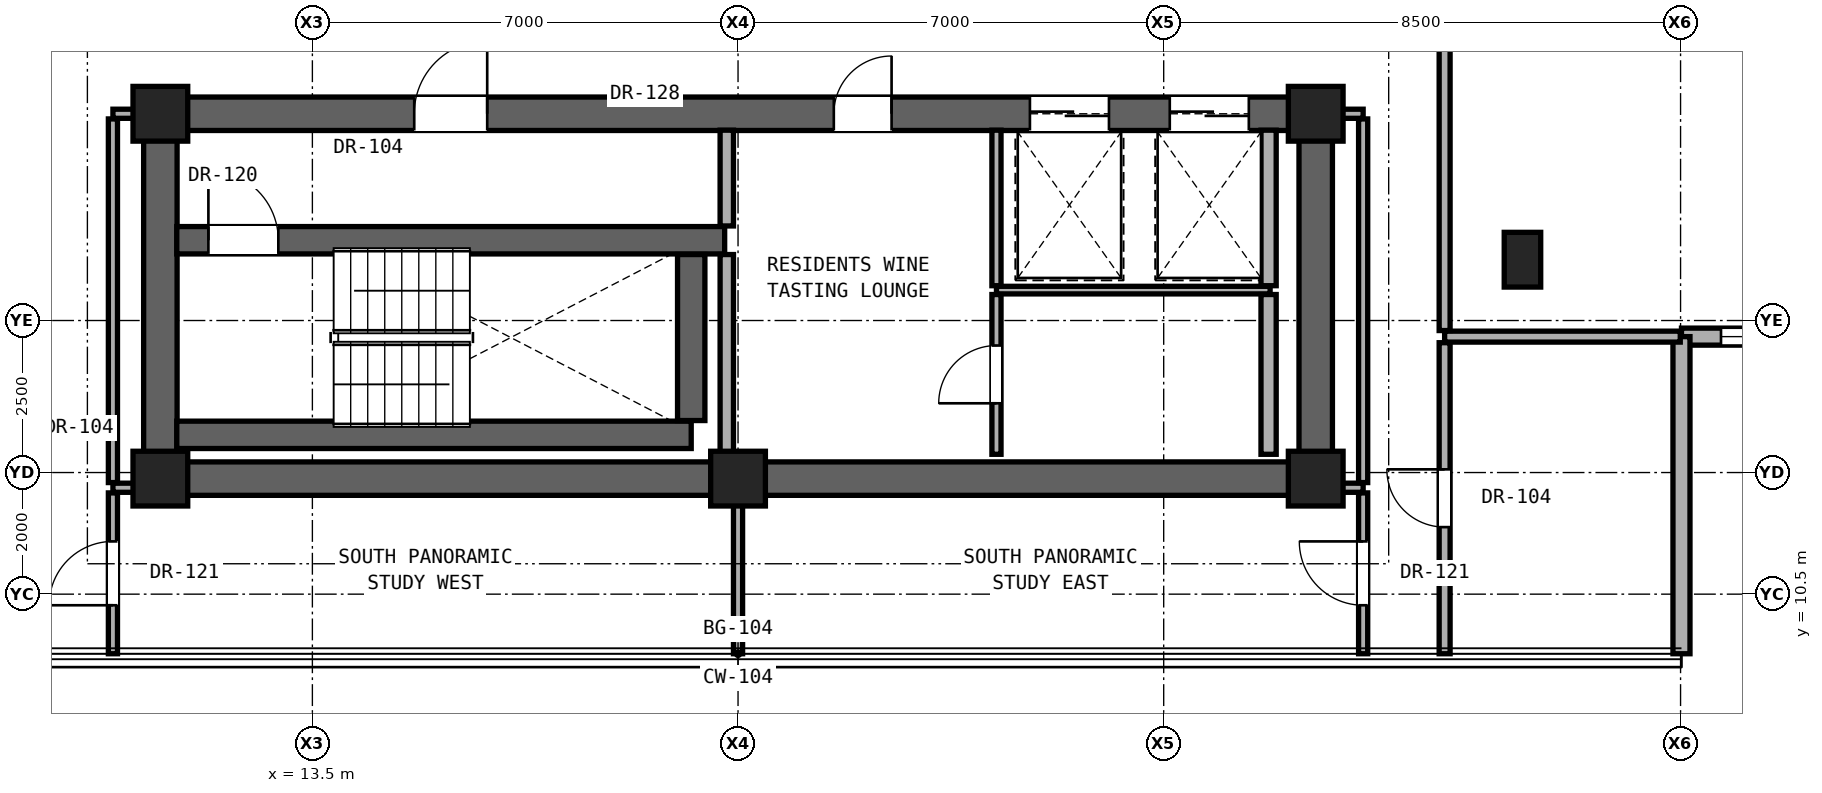
"""IFC4 building model, lengths in metres.
Left out: names, types, materials, properties, quantities, classifications, styles, units other than length and angle.
Written with IfcOpenShell. Run it as: python <this file> out.ifc"""

import sys

from ifc_helpers import new_model, si_unit, direction, frame, frame_2d, origin, origin_2d, place, context, subcontext, project, spatial, rectangle, extrude, element, fill, save


model = new_model("IFC4")
c1 = context("Model", 3, precision=1e-05, world=origin(), true_north=direction((0.0, 1.0)))
c2 = subcontext(c1, "Body", "Model", "MODEL_VIEW")
j1 = project(units=[si_unit("LENGTHUNIT", "METRE"), si_unit("PLANEANGLEUNIT", "RADIAN")], contexts=[c1])
p1 = place(None, origin())
s1 = spatial("IfcSite", under=j1, at=p1, CompositionType="ELEMENT")
p2 = place(p1, origin())
s2 = spatial("IfcBuilding", under=s1, at=p2, CompositionType="ELEMENT")
p3 = place(p2, frame((0.0, 0.0, 199.9)))
s3 = spatial("IfcBuildingStorey", under=s2, at=p3, CompositionType="ELEMENT", Elevation=199.9)
for number, where, z_axis, x_axis in (
    (1, (11.0, 12.4, 0.0), (0.0, 0.0, 1.0), (1.0, 0.0, 0.0)),
    (2, (20.5, 12.4, 0.0), (0.0, 0.0, 1.0), (1.0, 0.0, 0.0)),
    (3, (30.0, 12.4, 0.0), (0.0, 0.0, 1.0), (1.0, 0.0, 0.0)),
    (4, (11.0, 18.4, 0.0), (0.0, 0.0, 1.0), (1.0, 0.0, 0.0)),
    (5, (30.0, 18.4, 0.0), (0.0, 0.0, 1.0), (1.0, 0.0, 0.0)),
):
    element("IfcColumn", number, at=place(p3, frame(where, z_axis=z_axis, x_axis=x_axis)), inside=s3, PredefinedType="COLUMN", context=c2, shape_type="SweptSolid", body=[
        extrude(rectangle(XDim=0.9, YDim=0.9, at=origin_2d()), origin(), (0.0, 0.0, 1.0), 3.25),
    ])
p4 = place(p3, frame((33.4, 16.0, 0.0), z_axis=(0.0, 0.0, 1.0), x_axis=(1.0, 0.0, 0.0)))
e6 = element("IfcColumn", 6, at=p4, inside=s3, PredefinedType="PILASTER", context=c2, shape_type="SweptSolid", body=[
    extrude(rectangle(XDim=0.6, YDim=0.9, at=origin_2d()), origin(), (0.0, 0.0, 1.0), 3.25),
])
p5 = place(p3, frame((11.0, 12.4, 0.0), z_axis=(0.0, 0.0, 1.0), x_axis=(1.0, 0.0, 0.0)))
e7 = element("IfcWall", 7, at=p5, inside=s3, PredefinedType="SHEAR", context=c2, shape_type="SweptSolid", body=[
    extrude(rectangle(XDim=19.0, YDim=0.55, at=frame_2d((9.5, 0.0))), origin(), (0.0, 0.0, 1.0), 3.05),
])
for number, where, z_axis, x_axis in (
    (8, (11.0, 12.4, 0.0), (0.0, 0.0, 1.0), (0.0, 1.0, 0.0)),
    (9, (30.0, 12.4, 0.0), (0.0, 0.0, 1.0), (0.0, 1.0, 0.0)),
):
    element("IfcWall", number, at=place(p3, frame(where, z_axis=z_axis, x_axis=x_axis)), inside=s3, PredefinedType="SHEAR", context=c2, shape_type="SweptSolid", body=[
        extrude(rectangle(XDim=6.0, YDim=0.55, at=frame_2d((3.0, 0.0))), origin(), (0.0, 0.0, 1.0), 3.05),
    ])
p6 = place(p3, frame((11.0, 18.4, 0.0), z_axis=(0.0, 0.0, 1.0), x_axis=(1.0, 0.0, 0.0)))
e10 = element("IfcWall", 10, at=p6, inside=s3, PredefinedType="SHEAR", context=c2, shape_type="SweptSolid", body=[
    extrude(rectangle(XDim=19.0, YDim=0.55, at=frame_2d((9.5, 0.0))), origin(), (0.0, 0.0, 1.0), 3.05),
])
p7 = place(p6, frame((4.175, 0.0, 0.0)))
e11 = element("IfcOpeningElement", 11, at=p7, cuts=e10, PredefinedType="OPENING", context=c2, shape_type="SweptSolid", body=[
    extrude(rectangle(XDim=1.2, YDim=2.25, at=frame_2d((0.6, 1.125))), frame((0.0, 0.285, 0.0), z_axis=(0.0, -1.0, 0.0), x_axis=(1.0, 0.0, 0.0)), (0.0, 0.0, 1.0), 0.57),
])
p8 = place(p6, frame((11.075, 0.0, 0.0)))
e12 = element("IfcOpeningElement", 12, at=p8, cuts=e10, PredefinedType="OPENING", context=c2, shape_type="SweptSolid", body=[
    extrude(rectangle(XDim=0.95, YDim=2.15, at=frame_2d((0.475, 1.075))), frame((0.0, 0.285, 0.0), z_axis=(0.0, -1.0, 0.0), x_axis=(1.0, 0.0, 0.0)), (0.0, 0.0, 1.0), 0.57),
])
p9 = place(p6, frame((14.3, 0.0, 0.0)))
e13 = element("IfcOpeningElement", 13, at=p9, cuts=e10, PredefinedType="OPENING", context=c2, shape_type="SweptSolid", body=[
    extrude(rectangle(XDim=1.3, YDim=2.3, at=frame_2d((0.65, 1.15))), frame((0.0, 0.285, 0.0), z_axis=(0.0, -1.0, 0.0), x_axis=(1.0, 0.0, 0.0)), (0.0, 0.0, 1.0), 0.57),
])
p10 = place(p6, frame((16.6, 0.0, 0.0)))
e14 = element("IfcOpeningElement", 14, at=p10, cuts=e10, PredefinedType="OPENING", context=c2, shape_type="SweptSolid", body=[
    extrude(rectangle(XDim=1.3, YDim=2.3, at=frame_2d((0.65, 1.15))), frame((0.0, 0.285, 0.0), z_axis=(0.0, -1.0, 0.0), x_axis=(1.0, 0.0, 0.0)), (0.0, 0.0, 1.0), 0.57),
])
p11 = place(p3, frame((36.015, 14.735, 0.0), z_axis=(0.0, 0.0, 1.0), x_axis=(1.0, 0.0, 0.0)))
e15 = element("IfcWall", 15, at=p11, inside=s3, PredefinedType="SOLIDWALL", context=c2, shape_type="SweptSolid", body=[
    extrude(rectangle(XDim=5.215, YDim=0.28, at=frame_2d((2.607, 0.0))), origin(), (0.0, 0.0, 1.0), 3.03),
])
p12 = place(p11, frame((0.65, 0.0, 0.85)))
e16 = element("IfcOpeningElement", 16, at=p12, cuts=e15, PredefinedType="OPENING", context=c2, shape_type="SweptSolid", body=[
    extrude(rectangle(XDim=1.1, YDim=2.0, at=frame_2d((0.55, 1.0))), frame((0.0, 0.15, 0.0), z_axis=(0.0, -1.0, 0.0), x_axis=(1.0, 0.0, 0.0)), (0.0, 0.0, 1.0), 0.3),
])
p13 = place(p3, frame((36.015, 9.52, 0.0), z_axis=(0.0, 0.0, 1.0), x_axis=(0.0, 1.0, 0.0)))
e17 = element("IfcWall", 17, at=p13, inside=s3, PredefinedType="SOLIDWALL", context=c2, shape_type="SweptSolid", body=[
    extrude(rectangle(XDim=5.215, YDim=0.28, at=frame_2d((2.607, 0.0))), origin(), (0.0, 0.0, 1.0), 3.03),
])
for number, where, z_axis, x_axis in (
    (18, (10.22, 12.25, 0.0), (0.0, 0.0, 1.0), (1.0, 0.0, 0.0)),
    (19, (30.27, 12.25, 0.0), (0.0, 0.0, 1.0), (1.0, 0.0, 0.0)),
):
    element("IfcWall", number, at=place(p3, frame(where, z_axis=z_axis, x_axis=x_axis)), inside=s3, PredefinedType="PARTITIONING", context=c2, shape_type="SweptSolid", body=[
        extrude(rectangle(XDim=0.51, YDim=0.15, at=frame_2d((0.255, 0.0))), origin(), (0.0, 0.0, 1.0), 3.05),
    ])
p14 = place(p3, frame((11.27, 13.12, 0.0), z_axis=(0.0, 0.0, 1.0), x_axis=(1.0, 0.0, 0.0)))
e20 = element("IfcWall", 20, at=p14, inside=s3, PredefinedType="SHEAR", context=c2, shape_type="SweptSolid", body=[
    extrude(rectangle(XDim=8.46, YDim=0.45, at=frame_2d((4.23, 0.0))), origin(), (0.0, 0.0, 1.0), 3.05),
])
p15 = place(p3, frame((32.12, 14.735, 0.0), z_axis=(0.0, 0.0, 1.0), x_axis=(1.0, 0.0, 0.0)))
e21 = element("IfcWall", 21, at=p15, inside=s3, PredefinedType="PARTITIONING", context=c2, shape_type="SweptSolid", body=[
    extrude(rectangle(XDim=3.875, YDim=0.18, at=frame_2d((1.938, 0.0))), origin(), (0.0, 0.0, 1.0), 3.05),
])
p16 = place(p3, frame((24.75, 15.5, 0.0), z_axis=(0.0, 0.0, 1.0), x_axis=(1.0, 0.0, 0.0)))
e22 = element("IfcWall", 22, at=p16, inside=s3, PredefinedType="PARTITIONING", context=c2, shape_type="SweptSolid", body=[
    extrude(rectangle(XDim=4.5, YDim=0.125, at=frame_2d((2.25, 0.0))), origin(), (0.0, 0.0, 1.0), 3.05),
])
p17 = place(p3, frame((11.27, 16.32, 0.0), z_axis=(0.0, 0.0, 1.0), x_axis=(1.0, 0.0, 0.0)))
e23 = element("IfcWall", 23, at=p17, inside=s3, PredefinedType="SHEAR", context=c2, shape_type="SweptSolid", body=[
    extrude(rectangle(XDim=9.01, YDim=0.45, at=frame_2d((4.505, 0.0))), origin(), (0.0, 0.0, 1.0), 3.05),
])
p18 = place(p17, frame((0.52, 0.0, 0.0)))
e24 = element("IfcOpeningElement", 24, at=p18, cuts=e23, PredefinedType="OPENING", context=c2, shape_type="SweptSolid", body=[
    extrude(rectangle(XDim=1.15, YDim=2.2, at=frame_2d((0.575, 1.1))), frame((0.0, 0.235, 0.0), z_axis=(0.0, -1.0, 0.0), x_axis=(1.0, 0.0, 0.0)), (0.0, 0.0, 1.0), 0.47),
])
for number, where, z_axis, x_axis in (
    (25, (10.22, 18.4, 0.0), (0.0, 0.0, 1.0), (1.0, 0.0, 0.0)),
    (26, (30.27, 18.4, 0.0), (0.0, 0.0, 1.0), (1.0, 0.0, 0.0)),
):
    element("IfcWall", number, at=place(p3, frame(where, z_axis=z_axis, x_axis=x_axis)), inside=s3, PredefinedType="PARTITIONING", context=c2, shape_type="SweptSolid", body=[
        extrude(rectangle(XDim=0.51, YDim=0.15, at=frame_2d((0.255, 0.0))), origin(), (0.0, 0.0, 1.0), 2.442),
    ])
p19 = place(p3, frame((10.22, 9.52, 0.0), z_axis=(0.0, 0.0, 1.0), x_axis=(0.0, 1.0, 0.0)))
e27 = element("IfcWall", 27, at=p19, inside=s3, PredefinedType="PARTITIONING", context=c2, shape_type="SweptSolid", body=[
    extrude(rectangle(XDim=2.645, YDim=0.15, at=frame_2d((1.323, 0.0))), origin(), (0.0, 0.0, 1.0), 3.05),
])
p20 = place(p19, frame((0.798, 0.0, 0.0)))
e28 = element("IfcOpeningElement", 28, at=p20, cuts=e27, PredefinedType="OPENING", context=c2, shape_type="SweptSolid", body=[
    extrude(rectangle(XDim=1.05, YDim=2.2, at=frame_2d((0.525, 1.1))), frame((0.0, 0.085, 0.0), z_axis=(0.0, -1.0, 0.0), x_axis=(1.0, 0.0, 0.0)), (0.0, 0.0, 1.0), 0.17),
])
p21 = place(p3, frame((10.22, 12.335, 0.0), z_axis=(0.0, 0.0, 1.0), x_axis=(0.0, 1.0, 0.0)))
e29 = element("IfcWall", 29, at=p21, inside=s3, PredefinedType="PARTITIONING", context=c2, shape_type="SweptSolid", body=[
    extrude(rectangle(XDim=5.98, YDim=0.15, at=frame_2d((2.99, 0.0))), origin(), (0.0, 0.0, 1.0), 2.442),
])
p22 = place(p3, frame((19.73, 13.355, 0.0), z_axis=(0.0, 0.0, 1.0), x_axis=(0.0, 1.0, 0.0)))
e30 = element("IfcWall", 30, at=p22, inside=s3, PredefinedType="SHEAR", context=c2, shape_type="SweptSolid", body=[
    extrude(rectangle(XDim=2.73, YDim=0.45, at=frame_2d((1.365, 0.0))), origin(), (0.0, 0.0, 1.0), 3.05),
])
p23 = place(p3, frame((20.315, 12.8, 0.0), z_axis=(0.0, 0.0, 1.0), x_axis=(0.0, 1.0, 0.0)))
e31 = element("IfcWall", 31, at=p23, inside=s3, PredefinedType="SOLIDWALL", context=c2, shape_type="SweptSolid", body=[
    extrude(rectangle(XDim=3.285, YDim=0.22, at=frame_2d((1.643, 0.0))), origin(), (0.0, 0.0, 1.0), 3.05),
])
p24 = place(p3, frame((20.315, 16.555, 0.0), z_axis=(0.0, 0.0, 1.0), x_axis=(0.0, 1.0, 0.0)))
e32 = element("IfcWall", 32, at=p24, inside=s3, PredefinedType="SOLIDWALL", context=c2, shape_type="SweptSolid", body=[
    extrude(rectangle(XDim=1.575, YDim=0.22, at=frame_2d((0.788, 0.0))), origin(), (0.0, 0.0, 1.0), 3.05),
])
p25 = place(p3, frame((20.5, 9.52, 0.0), z_axis=(0.0, 0.0, 1.0), x_axis=(0.0, 1.0, 0.0)))
e33 = element("IfcWall", 33, at=p25, inside=s3, PredefinedType="PARTITIONING", context=c2, shape_type="SweptSolid", body=[
    extrude(rectangle(XDim=2.61, YDim=0.15, at=frame_2d((1.305, 0.0))), origin(), (0.0, 0.0, 1.0), 3.05),
])
p26 = place(p3, frame((24.75, 12.8, 0.0), z_axis=(0.0, 0.0, 1.0), x_axis=(0.0, 1.0, 0.0)))
e34 = element("IfcWall", 34, at=p26, inside=s3, PredefinedType="PARTITIONING", context=c2, shape_type="SweptSolid", body=[
    extrude(rectangle(XDim=2.627, YDim=0.15, at=frame_2d((1.314, 0.0))), origin(), (0.0, 0.0, 1.0), 3.05),
])
p27 = place(p26, frame((0.839, 0.0, 0.0)))
e35 = element("IfcOpeningElement", 35, at=p27, cuts=e34, PredefinedType="OPENING", context=c2, shape_type="SweptSolid", body=[
    extrude(rectangle(XDim=0.95, YDim=2.15, at=frame_2d((0.475, 1.075))), frame((0.0, 0.085, 0.0), z_axis=(0.0, -1.0, 0.0), x_axis=(1.0, 0.0, 0.0)), (0.0, 0.0, 1.0), 0.17),
])
p28 = place(p3, frame((24.75, 15.573, 0.0), z_axis=(0.0, 0.0, 1.0), x_axis=(0.0, 1.0, 0.0)))
e36 = element("IfcWall", 36, at=p28, inside=s3, PredefinedType="PARTITIONING", context=c2, shape_type="SweptSolid", body=[
    extrude(rectangle(XDim=2.557, YDim=0.15, at=frame_2d((1.279, 0.0))), origin(), (0.0, 0.0, 1.0), 3.05),
])
p29 = place(p3, frame((29.225, 12.8, 0.0), z_axis=(0.0, 0.0, 1.0), x_axis=(0.0, 1.0, 0.0)))
e37 = element("IfcWall", 37, at=p29, inside=s3, PredefinedType="SOLIDWALL", context=c2, shape_type="SweptSolid", body=[
    extrude(rectangle(XDim=2.627, YDim=0.25, at=frame_2d((1.314, 0.0))), origin(), (0.0, 0.0, 1.0), 3.05),
])
p30 = place(p3, frame((29.225, 15.573, 0.0), z_axis=(0.0, 0.0, 1.0), x_axis=(0.0, 1.0, 0.0)))
e38 = element("IfcWall", 38, at=p30, inside=s3, PredefinedType="SOLIDWALL", context=c2, shape_type="SweptSolid", body=[
    extrude(rectangle(XDim=2.557, YDim=0.25, at=frame_2d((1.279, 0.0))), origin(), (0.0, 0.0, 1.0), 3.05),
])
p31 = place(p3, frame((30.78, 9.52, 0.0), z_axis=(0.0, 0.0, 1.0), x_axis=(0.0, 1.0, 0.0)))
e39 = element("IfcWall", 39, at=p31, inside=s3, PredefinedType="PARTITIONING", context=c2, shape_type="SweptSolid", body=[
    extrude(rectangle(XDim=2.645, YDim=0.15, at=frame_2d((1.323, 0.0))), origin(), (0.0, 0.0, 1.0), 3.05),
])
p32 = place(p31, frame((0.798, 0.0, 0.0)))
e40 = element("IfcOpeningElement", 40, at=p32, cuts=e39, PredefinedType="OPENING", context=c2, shape_type="SweptSolid", body=[
    extrude(rectangle(XDim=1.05, YDim=2.2, at=frame_2d((0.525, 1.1))), frame((0.0, 0.085, 0.0), z_axis=(0.0, -1.0, 0.0), x_axis=(1.0, 0.0, 0.0)), (0.0, 0.0, 1.0), 0.17),
])
p33 = place(p3, frame((30.78, 12.335, 0.0), z_axis=(0.0, 0.0, 1.0), x_axis=(0.0, 1.0, 0.0)))
e41 = element("IfcWall", 41, at=p33, inside=s3, PredefinedType="PARTITIONING", context=c2, shape_type="SweptSolid", body=[
    extrude(rectangle(XDim=5.98, YDim=0.15, at=frame_2d((2.99, 0.0))), origin(), (0.0, 0.0, 1.0), 2.442),
])
p34 = place(p3, frame((32.12, 9.52, 0.0), z_axis=(0.0, 0.0, 1.0), x_axis=(0.0, 1.0, 0.0)))
e42 = element("IfcWall", 42, at=p34, inside=s3, PredefinedType="PARTITIONING", context=c2, shape_type="SweptSolid", body=[
    extrude(rectangle(XDim=5.115, YDim=0.18, at=frame_2d((2.558, 0.0))), origin(), (0.0, 0.0, 1.0), 3.05),
])
p35 = place(p34, frame((2.083, 0.0, 0.0)))
e43 = element("IfcOpeningElement", 43, at=p35, cuts=e42, PredefinedType="OPENING", context=c2, shape_type="SweptSolid", body=[
    extrude(rectangle(XDim=0.95, YDim=2.15, at=frame_2d((0.475, 1.075))), frame((0.0, 0.1, 0.0), z_axis=(0.0, -1.0, 0.0), x_axis=(1.0, 0.0, 0.0)), (0.0, 0.0, 1.0), 0.2),
])
p36 = place(p3, frame((32.12, 14.835, 0.0), z_axis=(0.0, 0.0, 1.0), x_axis=(0.0, 1.0, 0.0)))
e44 = element("IfcWall", 44, at=p36, inside=s3, PredefinedType="PARTITIONING", context=c2, shape_type="SweptSolid", body=[
    extrude(rectangle(XDim=10.345, YDim=0.18, at=frame_2d((5.172, 0.0))), origin(), (0.0, 0.0, 1.0), 2.346),
])
p37 = place(p36, frame((4.647, 0.0, 0.0)))
e45 = element("IfcOpeningElement", 45, at=p37, cuts=e44, PredefinedType="OPENING", context=c2, shape_type="SweptSolid", body=[
    extrude(rectangle(XDim=1.05, YDim=2.2, at=frame_2d((0.525, 1.1))), frame((0.0, 0.1, 0.0), z_axis=(0.0, -1.0, 0.0), x_axis=(1.0, 0.0, 0.0)), (0.0, 0.0, 1.0), 0.2),
])
p38 = place(p12, origin())
e46 = element("IfcWindow", 46, at=p38, inside=s3, PartitioningType="SINGLE_PANEL", PredefinedType="WINDOW", context=c2, shape_type="SweptSolid", body=[
    extrude(rectangle(XDim=1.1, YDim=2.0, at=frame_2d((0.55, 1.0))), frame((0.0, 0.03, 0.0), z_axis=(0.0, -1.0, 0.0), x_axis=(1.0, 0.0, 0.0)), (0.0, 0.0, 1.0), 0.06),
])
fill(e16, e46)
p39 = place(p7, origin())
e47 = element("IfcDoor", 47, at=p39, inside=s3, OperationType="SINGLE_SWING_RIGHT", PredefinedType="DOOR", context=c2, shape_type="SweptSolid", body=[
    extrude(rectangle(XDim=1.2, YDim=2.25, at=frame_2d((0.6, 1.125))), frame((0.0, 0.025, 0.0), z_axis=(0.0, -1.0, 0.0), x_axis=(1.0, 0.0, 0.0)), (0.0, 0.0, 1.0), 0.05),
])
fill(e11, e47)
p40 = place(p18, origin())
e48 = element("IfcDoor", 48, at=p40, inside=s3, OperationType="SINGLE_SWING_LEFT", PredefinedType="DOOR", context=c2, shape_type="SweptSolid", body=[
    extrude(rectangle(XDim=1.15, YDim=2.2, at=frame_2d((0.575, 1.1))), frame((0.0, 0.025, 0.0), z_axis=(0.0, -1.0, 0.0), x_axis=(1.0, 0.0, 0.0)), (0.0, 0.0, 1.0), 0.05),
])
fill(e24, e48)
p41 = place(p8, origin())
e49 = element("IfcDoor", 49, at=p41, inside=s3, OperationType="SINGLE_SWING_RIGHT", PredefinedType="DOOR", context=c2, shape_type="SweptSolid", body=[
    extrude(rectangle(XDim=0.95, YDim=2.15, at=frame_2d((0.475, 1.075))), frame((0.0, 0.025, 0.0), z_axis=(0.0, -1.0, 0.0), x_axis=(1.0, 0.0, 0.0)), (0.0, 0.0, 1.0), 0.05),
])
fill(e12, e49)
p42 = place(p27, origin())
e50 = element("IfcDoor", 50, at=p42, inside=s3, OperationType="SINGLE_SWING_LEFT", PredefinedType="DOOR", context=c2, shape_type="SweptSolid", body=[
    extrude(rectangle(XDim=0.95, YDim=2.15, at=frame_2d((0.475, 1.075))), frame((0.0, 0.025, 0.0), z_axis=(0.0, -1.0, 0.0), x_axis=(1.0, 0.0, 0.0)), (0.0, 0.0, 1.0), 0.05),
])
fill(e35, e50)
p43 = place(p20, origin())
e51 = element("IfcDoor", 51, at=p43, inside=s3, OperationType="SINGLE_SWING_LEFT", PredefinedType="DOOR", context=c2, shape_type="SweptSolid", body=[
    extrude(rectangle(XDim=1.05, YDim=2.2, at=frame_2d((0.525, 1.1))), frame((0.0, 0.025, 0.0), z_axis=(0.0, -1.0, 0.0), x_axis=(1.0, 0.0, 0.0)), (0.0, 0.0, 1.0), 0.05),
])
fill(e28, e51)
p44 = place(p32, origin())
e52 = element("IfcDoor", 52, at=p44, inside=s3, OperationType="SINGLE_SWING_RIGHT", PredefinedType="DOOR", context=c2, shape_type="SweptSolid", body=[
    extrude(rectangle(XDim=1.05, YDim=2.2, at=frame_2d((0.525, 1.1))), frame((0.0, 0.025, 0.0), z_axis=(0.0, -1.0, 0.0), x_axis=(1.0, 0.0, 0.0)), (0.0, 0.0, 1.0), 0.05),
])
fill(e40, e52)
p45 = place(p35, origin())
e53 = element("IfcDoor", 53, at=p45, inside=s3, OperationType="SINGLE_SWING_RIGHT", PredefinedType="DOOR", context=c2, shape_type="SweptSolid", body=[
    extrude(rectangle(XDim=0.95, YDim=2.15, at=frame_2d((0.475, 1.075))), frame((0.0, 0.025, 0.0), z_axis=(0.0, -1.0, 0.0), x_axis=(1.0, 0.0, 0.0)), (0.0, 0.0, 1.0), 0.05),
])
fill(e43, e53)
p46 = place(p9, origin())
e54 = element("IfcDoor", 54, at=p46, inside=s3, OperationType="DOUBLE_DOOR_SLIDING", PredefinedType="DOOR", context=c2, shape_type="SweptSolid", body=[
    extrude(rectangle(XDim=1.3, YDim=2.3, at=frame_2d((0.65, 1.15))), frame((0.0, 0.025, 0.0), z_axis=(0.0, -1.0, 0.0), x_axis=(1.0, 0.0, 0.0)), (0.0, 0.0, 1.0), 0.05),
])
fill(e13, e54)
p47 = place(p10, origin())
e55 = element("IfcDoor", 55, at=p47, inside=s3, OperationType="DOUBLE_DOOR_SLIDING", PredefinedType="DOOR", context=c2, shape_type="SweptSolid", body=[
    extrude(rectangle(XDim=1.3, YDim=2.3, at=frame_2d((0.65, 1.15))), frame((0.0, 0.025, 0.0), z_axis=(0.0, -1.0, 0.0), x_axis=(1.0, 0.0, 0.0)), (0.0, 0.0, 1.0), 0.05),
])
fill(e14, e55)
save(model, sys.argv[1])
